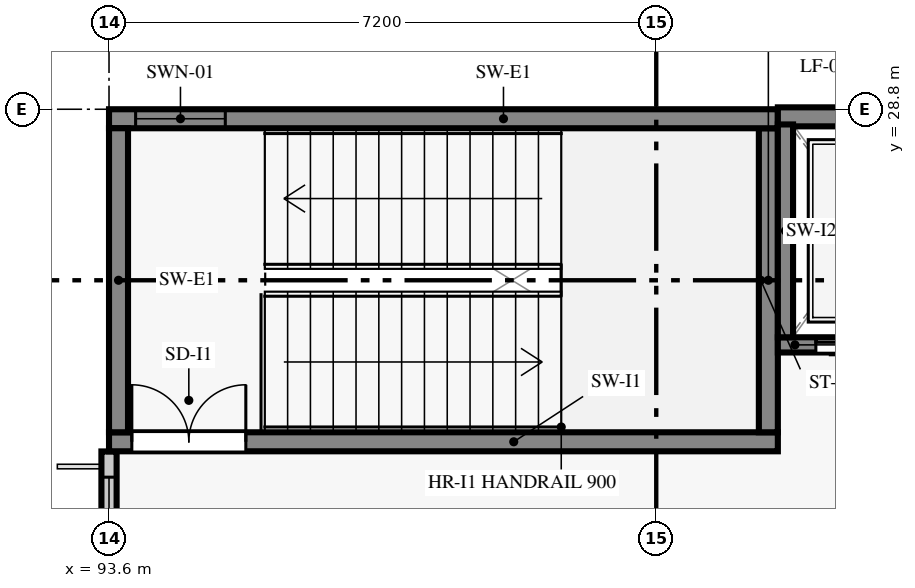
"""IFC4 building model, lengths in metres.
Left out: names, types, materials, properties, quantities, classifications, styles, units other than length and angle.
Written with IfcOpenShell. Run it as: python <this file> out.ifc"""

import sys

from ifc_helpers import new_model, si_unit, direction, frame, frame_2d, origin, place, context, subcontext, project, spatial, rectangle, extrude, element, fill, save


model = new_model("IFC4")
c1 = context("Model", 3, precision=1e-05, world=origin(), true_north=direction((0.0, 1.0)))
c2 = subcontext(c1, "Body", "Model", "MODEL_VIEW")
j1 = project(units=[si_unit("LENGTHUNIT", "METRE"), si_unit("PLANEANGLEUNIT", "RADIAN")], contexts=[c1])
p1 = place(None, origin())
s1 = spatial("IfcSite", under=j1, at=p1, CompositionType="ELEMENT")
p2 = place(p1, origin())
s2 = spatial("IfcBuilding", under=s1, at=p2, CompositionType="ELEMENT")
p3 = place(p2, frame((0.0, 0.0, 13.8)))
s3 = spatial("IfcBuildingStorey", under=s2, at=p3, CompositionType="ELEMENT", Elevation=13.8)
p4 = place(p3, frame((93.6, 24.298, 0.0), z_axis=(0.0, 0.0, 1.0), x_axis=(0.0, -1.0, 0.0)))
e1 = element("IfcWall", 1, at=p4, inside=s3, PredefinedType="STANDARD", context=c2, shape_type="SweptSolid", body=[
    extrude(rectangle(XDim=2.427, YDim=0.2, at=frame_2d((1.213, 0.0))), origin(), (0.0, 0.0, 1.0), 3.88),
])
p5 = place(p4, frame((0.338, 0.0, 0.9)))
e2 = element("IfcOpeningElement", 2, at=p5, cuts=e1, PredefinedType="OPENING", context=c2, shape_type="SweptSolid", body=[
    extrude(rectangle(XDim=1.75, YDim=1.42, at=frame_2d((0.875, 0.71))), frame((0.0, 0.11, 0.0), z_axis=(0.0, -1.0, 0.0), x_axis=(1.0, 0.0, 0.0)), (0.0, 0.0, 1.0), 0.22),
])
p6 = place(p3, frame((93.6, 24.425, 0.0), z_axis=(0.0, 0.0, 1.0), x_axis=(1.0, 0.0, 0.0)))
e3 = element("IfcWall", 3, at=p6, inside=s3, PredefinedType="SHEAR", context=c2, shape_type="SweptSolid", body=[
    extrude(rectangle(XDim=8.8, YDim=0.25, at=frame_2d((4.4, 0.0))), origin(), (0.0, 0.0, 1.0), 3.88),
])
p7 = place(p6, frame((0.3, 0.0, 0.0)))
e4 = element("IfcOpeningElement", 4, at=p7, cuts=e3, PredefinedType="OPENING", context=c2, shape_type="SweptSolid", body=[
    extrude(rectangle(XDim=1.5, YDim=2.15, at=frame_2d((0.75, 1.075))), frame((0.0, 0.135, 0.0), z_axis=(0.0, -1.0, 0.0), x_axis=(1.0, 0.0, 0.0)), (0.0, 0.0, 1.0), 0.27),
])
p8 = place(p3, frame((102.275, 24.55, 0.0), z_axis=(0.0, 0.0, 1.0), x_axis=(0.0, 1.0, 0.0)))
e5 = element("IfcWall", 5, at=p8, inside=s3, PredefinedType="SHEAR", context=c2, shape_type="SweptSolid", body=[
    extrude(rectangle(XDim=4.0, YDim=0.25, at=frame_2d((2.0, 0.0))), origin(), (0.0, 0.0, 1.0), 3.88),
])
p9 = place(p3, frame((102.4, 28.675, 0.0), z_axis=(0.0, 0.0, 1.0), x_axis=(-1.0, 0.0, 0.0)))
e6 = element("IfcWall", 6, at=p9, inside=s3, PredefinedType="SHEAR", context=c2, shape_type="SweptSolid", body=[
    extrude(rectangle(XDim=8.8, YDim=0.25, at=frame_2d((4.4, 0.0))), origin(), (0.0, 0.0, 1.0), 3.88),
])
p10 = place(p9, frame((7.27, 0.0, 0.92)))
e7 = element("IfcOpeningElement", 7, at=p10, cuts=e6, PredefinedType="OPENING", context=c2, shape_type="SweptSolid", body=[
    extrude(rectangle(XDim=1.18, YDim=1.48, at=frame_2d((0.59, 0.74))), frame((0.0, 0.135, 0.0), z_axis=(0.0, -1.0, 0.0), x_axis=(1.0, 0.0, 0.0)), (0.0, 0.0, 1.0), 0.27),
])
p11 = place(p3, frame((93.725, 28.55, 0.0), z_axis=(0.0, 0.0, 1.0), x_axis=(0.0, -1.0, 0.0)))
e8 = element("IfcWall", 8, at=p11, inside=s3, PredefinedType="SHEAR", context=c2, shape_type="SweptSolid", body=[
    extrude(rectangle(XDim=4.0, YDim=0.25, at=frame_2d((2.0, 0.0))), origin(), (0.0, 0.0, 1.0), 3.88),
])
p12 = place(p3, frame((102.4, 25.7, 0.0), z_axis=(0.0, 0.0, 1.0), x_axis=(1.0, 0.0, 0.0)))
e9 = element("IfcWall", 9, at=p12, inside=s3, PredefinedType="SHEAR", context=c2, shape_type="SweptSolid", body=[
    extrude(rectangle(XDim=2.4, YDim=0.2, at=frame_2d((1.2, 0.0))), origin(), (0.0, 0.0, 1.0), 3.88),
])
p13 = place(p12, frame((0.5, 0.0, 0.0)))
e10 = element("IfcOpeningElement", 10, at=p13, cuts=e9, PredefinedType="OPENING", context=c2, shape_type="SweptSolid", body=[
    extrude(rectangle(XDim=1.4, YDim=2.15, at=frame_2d((0.7, 1.075))), frame((0.0, 0.11, 0.0), z_axis=(0.0, -1.0, 0.0), x_axis=(1.0, 0.0, 0.0)), (0.0, 0.0, 1.0), 0.22),
])
p14 = place(p3, frame((104.8, 28.7, 0.0), z_axis=(0.0, 0.0, 1.0), x_axis=(-1.0, 0.0, 0.0)))
e11 = element("IfcWall", 11, at=p14, inside=s3, PredefinedType="SHEAR", context=c2, shape_type="SweptSolid", body=[
    extrude(rectangle(XDim=2.4, YDim=0.25, at=frame_2d((1.2, 0.0))), origin(), (0.0, 0.0, 1.0), 3.88),
])
p15 = place(p3, frame((102.5, 28.6, 0.0), z_axis=(0.0, 0.0, 1.0), x_axis=(0.0, -1.0, 0.0)))
e12 = element("IfcWall", 12, at=p15, inside=s3, PredefinedType="SHEAR", context=c2, shape_type="SweptSolid", body=[
    extrude(rectangle(XDim=2.8, YDim=0.2, at=frame_2d((1.4, 0.0))), origin(), (0.0, 0.0, 1.0), 3.88),
])
p16 = place(p5, origin())
e13 = element("IfcWindow", 13, at=p16, inside=s3, PartitioningType="SINGLE_PANEL", PredefinedType="WINDOW", context=c2, shape_type="SweptSolid", body=[
    extrude(rectangle(XDim=1.75, YDim=1.42, at=frame_2d((0.875, 0.71))), frame((0.0, 0.03, 0.0), z_axis=(0.0, -1.0, 0.0), x_axis=(1.0, 0.0, 0.0)), (0.0, 0.0, 1.0), 0.06),
])
fill(e2, e13)
p17 = place(p7, origin())
e14 = element("IfcDoor", 14, at=p17, inside=s3, OperationType="DOUBLE_DOOR_SINGLE_SWING", PredefinedType="DOOR", context=c2, shape_type="SweptSolid", body=[
    extrude(rectangle(XDim=1.5, YDim=2.15, at=frame_2d((0.75, 1.075))), frame((0.0, 0.025, 0.0), z_axis=(0.0, -1.0, 0.0), x_axis=(1.0, 0.0, 0.0)), (0.0, 0.0, 1.0), 0.05),
])
fill(e4, e14)
p18 = place(p10, origin())
e15 = element("IfcWindow", 15, at=p18, inside=s3, PartitioningType="SINGLE_PANEL", PredefinedType="WINDOW", context=c2, shape_type="SweptSolid", body=[
    extrude(rectangle(XDim=1.18, YDim=1.48, at=frame_2d((0.59, 0.74))), frame((0.0, 0.03, 0.0), z_axis=(0.0, -1.0, 0.0), x_axis=(1.0, 0.0, 0.0)), (0.0, 0.0, 1.0), 0.06),
])
fill(e7, e15)
p19 = place(p13, frame((1.4, 0.0, 0.0), z_axis=(0.0, 0.0, 1.0), x_axis=(-1.0, 0.0, 0.0)))
e16 = element("IfcDoor", 16, at=p19, inside=s3, OperationType="DOUBLE_DOOR_SLIDING", PredefinedType="DOOR", context=c2, shape_type="SweptSolid", body=[
    extrude(rectangle(XDim=1.4, YDim=2.15, at=frame_2d((0.7, 1.075))), frame((0.0, 0.025, 0.0), z_axis=(0.0, -1.0, 0.0), x_axis=(1.0, 0.0, 0.0)), (0.0, 0.0, 1.0), 0.05),
])
fill(e10, e16)
save(model, sys.argv[1])
